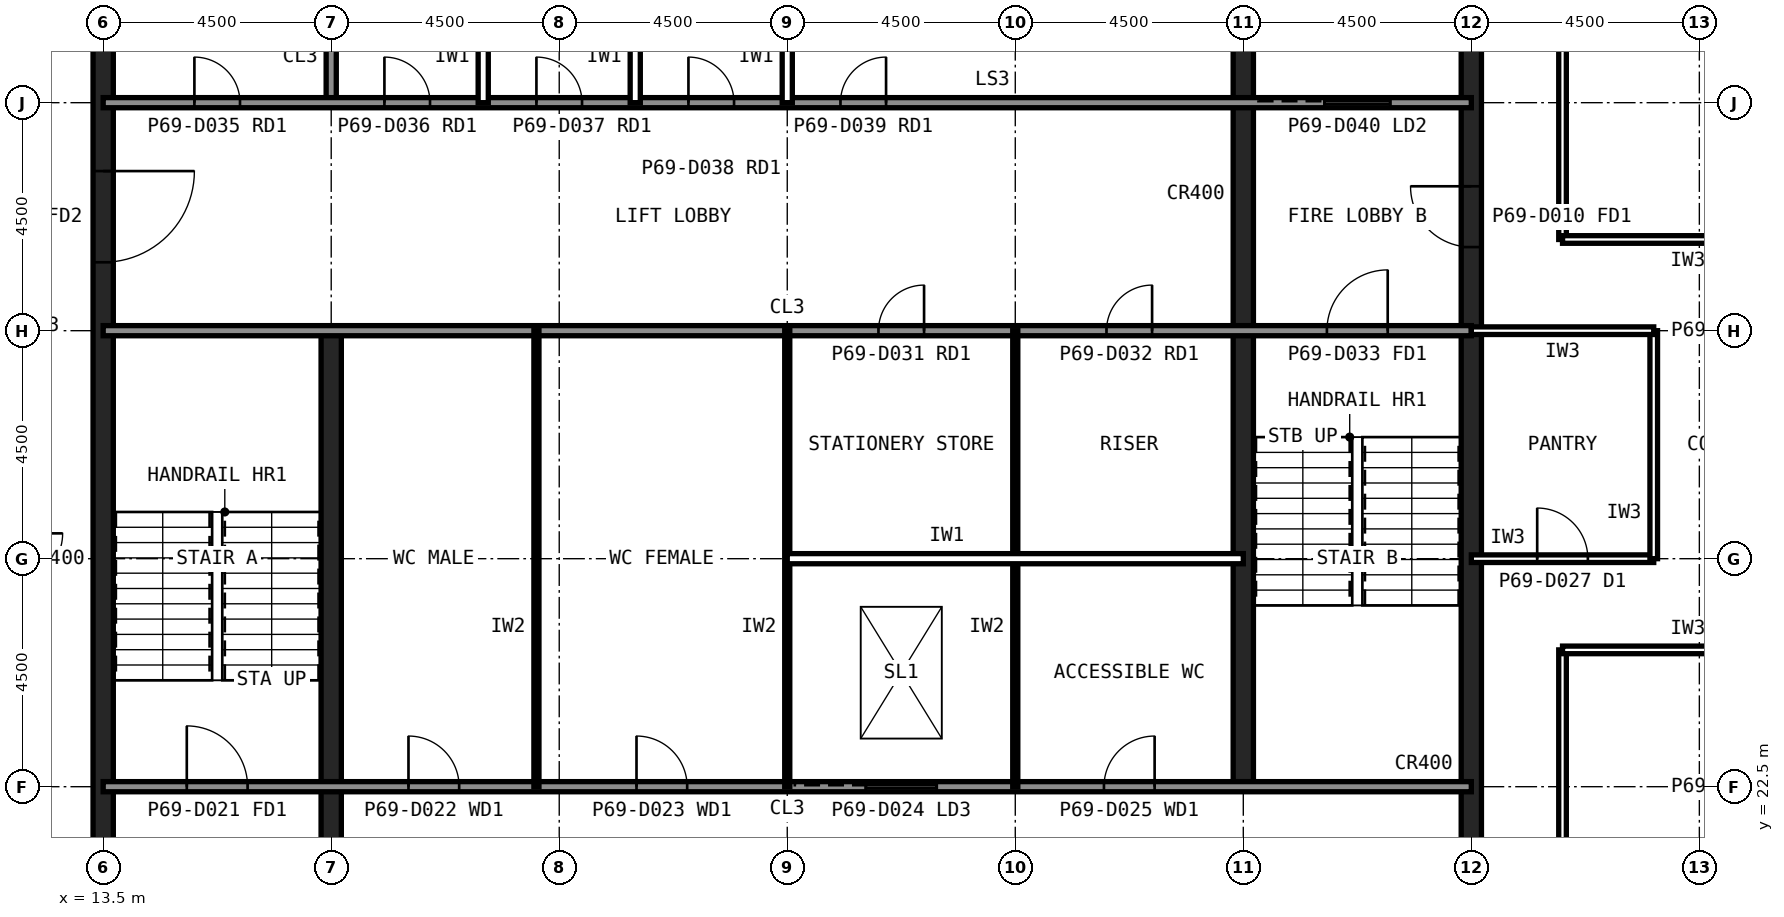
"""IFC4 building model, lengths in metres.
Left out: names, types, materials, properties, quantities, classifications, styles, units other than length and angle.
Written with IfcOpenShell. Run it as: python <this file> out.ifc"""

import sys

from ifc_helpers import new_model, si_unit, direction, frame, frame_2d, origin, place, context, subcontext, project, spatial, rectangle, extrude, element, fill, save


model = new_model("IFC4")
c1 = context("Model", 3, precision=1e-05, world=origin(), true_north=direction((0.0, 1.0)))
c2 = subcontext(c1, "Body", "Model", "MODEL_VIEW")
j1 = project(units=[si_unit("LENGTHUNIT", "METRE"), si_unit("PLANEANGLEUNIT", "RADIAN")], contexts=[c1])
p1 = place(None, origin())
s1 = spatial("IfcSite", under=j1, at=p1, CompositionType="ELEMENT")
p2 = place(p1, origin())
s2 = spatial("IfcBuilding", under=s1, at=p2, CompositionType="ELEMENT")
p3 = place(p2, frame((0.0, 0.0, 286.6)))
s3 = spatial("IfcBuildingStorey", under=s2, at=p3, CompositionType="ELEMENT", Elevation=286.6)
p4 = place(p3, frame((40.5, 13.5, 0.0), z_axis=(0.0, 0.0, 1.0), x_axis=(0.0, 1.0, 0.0)))
e1 = element("IfcWall", 1, at=p4, inside=s3, PredefinedType="SHEAR", context=c2, shape_type="SweptSolid", body=[
    extrude(rectangle(XDim=27.0, YDim=0.4, at=frame_2d((13.5, 0.0))), origin(), (0.0, 0.0, 1.0), 4.0),
])
p5 = place(p4, frame((5.85, 0.0, 0.0)))
e2 = element("IfcOpeningElement", 2, at=p5, cuts=e1, PredefinedType="OPENING", context=c2, shape_type="SweptSolid", body=[
    extrude(rectangle(XDim=1.8, YDim=2.1, at=frame_2d((0.9, 1.05))), frame((0.0, 0.21, 0.0), z_axis=(0.0, -1.0, 0.0), x_axis=(1.0, 0.0, 0.0)), (0.0, 0.0, 1.0), 0.42),
])
p6 = place(p4, frame((19.65, 0.0, 0.0)))
e3 = element("IfcOpeningElement", 3, at=p6, cuts=e1, PredefinedType="OPENING", context=c2, shape_type="SweptSolid", body=[
    extrude(rectangle(XDim=1.2, YDim=2.1, at=frame_2d((0.6, 1.05))), frame((0.0, 0.21, 0.0), z_axis=(0.0, -1.0, 0.0), x_axis=(1.0, 0.0, 0.0)), (0.0, 0.0, 1.0), 0.42),
])
p7 = place(p3, frame((13.5, 40.5, 0.0), z_axis=(0.0, 0.0, 1.0), x_axis=(0.0, -1.0, 0.0)))
e4 = element("IfcWall", 4, at=p7, inside=s3, PredefinedType="SHEAR", context=c2, shape_type="SweptSolid", body=[
    extrude(rectangle(XDim=27.0, YDim=0.4, at=frame_2d((13.5, 0.0))), origin(), (0.0, 0.0, 1.0), 4.0),
])
p8 = place(p7, frame((19.65, 0.0, 0.0)))
e5 = element("IfcOpeningElement", 5, at=p8, cuts=e4, PredefinedType="OPENING", context=c2, shape_type="SweptSolid", body=[
    extrude(rectangle(XDim=1.2, YDim=2.1, at=frame_2d((0.6, 1.05))), frame((0.0, 0.21, 0.0), z_axis=(0.0, -1.0, 0.0), x_axis=(1.0, 0.0, 0.0)), (0.0, 0.0, 1.0), 0.42),
])
p9 = place(p7, frame((5.85, 0.0, 0.0)))
e6 = element("IfcOpeningElement", 6, at=p9, cuts=e4, PredefinedType="OPENING", context=c2, shape_type="SweptSolid", body=[
    extrude(rectangle(XDim=1.8, YDim=2.1, at=frame_2d((0.9, 1.05))), frame((0.0, 0.21, 0.0), z_axis=(0.0, -1.0, 0.0), x_axis=(1.0, 0.0, 0.0)), (0.0, 0.0, 1.0), 0.42),
])
p10 = place(p3, frame((18.0, 13.5, 0.0), z_axis=(0.0, 0.0, 1.0), x_axis=(0.0, 1.0, 0.0)))
e7 = element("IfcWall", 7, at=p10, inside=s3, PredefinedType="SHEAR", context=c2, shape_type="SweptSolid", body=[
    extrude(rectangle(XDim=18.0, YDim=0.4, at=frame_2d((9.0, 0.0))), origin(), (0.0, 0.0, 1.0), 4.0),
])
p11 = place(p3, frame((18.0, 36.0, 0.0), z_axis=(0.0, 0.0, 1.0), x_axis=(0.0, 1.0, 0.0)))
e8 = element("IfcWall", 8, at=p11, inside=s3, PredefinedType="SOLIDWALL", context=c2, shape_type="SweptSolid", body=[
    extrude(rectangle(XDim=4.5, YDim=0.2, at=frame_2d((2.25, 0.0))), origin(), (0.0, 0.0, 1.0), 3.84),
])
p12 = place(p3, frame((36.0, 22.5, 0.0), z_axis=(0.0, 0.0, 1.0), x_axis=(0.0, 1.0, 0.0)))
e9 = element("IfcWall", 9, at=p12, inside=s3, PredefinedType="SHEAR", context=c2, shape_type="SweptSolid", body=[
    extrude(rectangle(XDim=18.0, YDim=0.4, at=frame_2d((9.0, 0.0))), origin(), (0.0, 0.0, 1.0), 4.0),
])
p13 = place(p3, frame((13.5, 36.0, 0.0), z_axis=(0.0, 0.0, 1.0), x_axis=(1.0, 0.0, 0.0)))
e10 = element("IfcWall", 10, at=p13, inside=s3, PredefinedType="SOLIDWALL", context=c2, shape_type="SweptSolid", body=[
    extrude(rectangle(XDim=27.0, YDim=0.2, at=frame_2d((13.5, 0.0))), origin(), (0.0, 0.0, 1.0), 3.84),
])
p14 = place(p13, frame((1.8, 0.0, 0.0)))
e11 = element("IfcOpeningElement", 11, at=p14, cuts=e10, PredefinedType="OPENING", context=c2, shape_type="SweptSolid", body=[
    extrude(rectangle(XDim=0.9, YDim=2.1, at=frame_2d((0.45, 1.05))), frame((0.0, 0.11, 0.0), z_axis=(0.0, -1.0, 0.0), x_axis=(1.0, 0.0, 0.0)), (0.0, 0.0, 1.0), 0.22),
])
p15 = place(p13, frame((5.55, 0.0, 0.0)))
e12 = element("IfcOpeningElement", 12, at=p15, cuts=e10, PredefinedType="OPENING", context=c2, shape_type="SweptSolid", body=[
    extrude(rectangle(XDim=0.9, YDim=2.1, at=frame_2d((0.45, 1.05))), frame((0.0, 0.11, 0.0), z_axis=(0.0, -1.0, 0.0), x_axis=(1.0, 0.0, 0.0)), (0.0, 0.0, 1.0), 0.22),
])
p16 = place(p13, frame((14.55, 0.0, 0.0)))
e13 = element("IfcOpeningElement", 13, at=p16, cuts=e10, PredefinedType="OPENING", context=c2, shape_type="SweptSolid", body=[
    extrude(rectangle(XDim=0.9, YDim=2.1, at=frame_2d((0.45, 1.05))), frame((0.0, 0.11, 0.0), z_axis=(0.0, -1.0, 0.0), x_axis=(1.0, 0.0, 0.0)), (0.0, 0.0, 1.0), 0.22),
])
p17 = place(p13, frame((17.55, 0.0, 0.0)))
e14 = element("IfcOpeningElement", 14, at=p17, cuts=e10, PredefinedType="OPENING", context=c2, shape_type="SweptSolid", body=[
    extrude(rectangle(XDim=0.9, YDim=2.1, at=frame_2d((0.45, 1.05))), frame((0.0, 0.11, 0.0), z_axis=(0.0, -1.0, 0.0), x_axis=(1.0, 0.0, 0.0)), (0.0, 0.0, 1.0), 0.22),
])
p18 = place(p13, frame((24.1, 0.0, 0.0)))
e15 = element("IfcOpeningElement", 15, at=p18, cuts=e10, PredefinedType="OPENING", context=c2, shape_type="SweptSolid", body=[
    extrude(rectangle(XDim=1.3, YDim=2.2, at=frame_2d((0.65, 1.1))), frame((0.0, 0.11, 0.0), z_axis=(0.0, -1.0, 0.0), x_axis=(1.0, 0.0, 0.0)), (0.0, 0.0, 1.0), 0.22),
])
p19 = place(p3, frame((13.5, 22.5, 0.0), z_axis=(0.0, 0.0, 1.0), x_axis=(1.0, 0.0, 0.0)))
e16 = element("IfcWall", 16, at=p19, inside=s3, PredefinedType="SOLIDWALL", context=c2, shape_type="SweptSolid", body=[
    extrude(rectangle(XDim=27.0, YDim=0.2, at=frame_2d((13.5, 0.0))), origin(), (0.0, 0.0, 1.0), 3.84),
])
p20 = place(p19, frame((1.65, 0.0, 0.0)))
e17 = element("IfcOpeningElement", 17, at=p20, cuts=e16, PredefinedType="OPENING", context=c2, shape_type="SweptSolid", body=[
    extrude(rectangle(XDim=1.2, YDim=2.1, at=frame_2d((0.6, 1.05))), frame((0.0, 0.11, 0.0), z_axis=(0.0, -1.0, 0.0), x_axis=(1.0, 0.0, 0.0)), (0.0, 0.0, 1.0), 0.22),
])
p21 = place(p19, frame((6.025, 0.0, 0.0)))
e18 = element("IfcOpeningElement", 18, at=p21, cuts=e16, PredefinedType="OPENING", context=c2, shape_type="SweptSolid", body=[
    extrude(rectangle(XDim=1.0, YDim=2.1, at=frame_2d((0.5, 1.05))), frame((0.0, 0.11, 0.0), z_axis=(0.0, -1.0, 0.0), x_axis=(1.0, 0.0, 0.0)), (0.0, 0.0, 1.0), 0.22),
])
p22 = place(p19, frame((10.525, 0.0, 0.0)))
e19 = element("IfcOpeningElement", 19, at=p22, cuts=e16, PredefinedType="OPENING", context=c2, shape_type="SweptSolid", body=[
    extrude(rectangle(XDim=1.0, YDim=2.1, at=frame_2d((0.5, 1.05))), frame((0.0, 0.11, 0.0), z_axis=(0.0, -1.0, 0.0), x_axis=(1.0, 0.0, 0.0)), (0.0, 0.0, 1.0), 0.22),
])
p23 = place(p19, frame((19.75, 0.0, 0.0)))
e20 = element("IfcOpeningElement", 20, at=p23, cuts=e16, PredefinedType="OPENING", context=c2, shape_type="SweptSolid", body=[
    extrude(rectangle(XDim=1.0, YDim=2.1, at=frame_2d((0.5, 1.05))), frame((0.0, 0.11, 0.0), z_axis=(0.0, -1.0, 0.0), x_axis=(1.0, 0.0, 0.0)), (0.0, 0.0, 1.0), 0.22),
])
p24 = place(p19, frame((15.05, 0.0, 0.0)))
e21 = element("IfcOpeningElement", 21, at=p24, cuts=e16, PredefinedType="OPENING", context=c2, shape_type="SweptSolid", body=[
    extrude(rectangle(XDim=1.4, YDim=2.4, at=frame_2d((0.7, 1.2))), frame((0.0, 0.11, 0.0), z_axis=(0.0, -1.0, 0.0), x_axis=(1.0, 0.0, 0.0)), (0.0, 0.0, 1.0), 0.22),
])
p25 = place(p3, frame((13.5, 31.5, 0.0), z_axis=(0.0, 0.0, 1.0), x_axis=(1.0, 0.0, 0.0)))
e22 = element("IfcWall", 22, at=p25, inside=s3, PredefinedType="SOLIDWALL", context=c2, shape_type="SweptSolid", body=[
    extrude(rectangle(XDim=27.0, YDim=0.2, at=frame_2d((13.5, 0.0))), origin(), (0.0, 0.0, 1.0), 3.84),
])
p26 = place(p25, frame((24.15, 0.0, 0.0)))
e23 = element("IfcOpeningElement", 23, at=p26, cuts=e22, PredefinedType="OPENING", context=c2, shape_type="SweptSolid", body=[
    extrude(rectangle(XDim=1.2, YDim=2.1, at=frame_2d((0.6, 1.05))), frame((0.0, 0.11, 0.0), z_axis=(0.0, -1.0, 0.0), x_axis=(1.0, 0.0, 0.0)), (0.0, 0.0, 1.0), 0.22),
])
p27 = place(p25, frame((15.3, 0.0, 0.0)))
e24 = element("IfcOpeningElement", 24, at=p27, cuts=e22, PredefinedType="OPENING", context=c2, shape_type="SweptSolid", body=[
    extrude(rectangle(XDim=0.9, YDim=2.1, at=frame_2d((0.45, 1.05))), frame((0.0, 0.11, 0.0), z_axis=(0.0, -1.0, 0.0), x_axis=(1.0, 0.0, 0.0)), (0.0, 0.0, 1.0), 0.22),
])
p28 = place(p25, frame((19.8, 0.0, 0.0)))
e25 = element("IfcOpeningElement", 25, at=p28, cuts=e22, PredefinedType="OPENING", context=c2, shape_type="SweptSolid", body=[
    extrude(rectangle(XDim=0.9, YDim=2.1, at=frame_2d((0.45, 1.05))), frame((0.0, 0.11, 0.0), z_axis=(0.0, -1.0, 0.0), x_axis=(1.0, 0.0, 0.0)), (0.0, 0.0, 1.0), 0.22),
])
for number, where, z_axis, x_axis in (
    (26, (27.0, 36.0, 0.0), (0.0, 0.0, 1.0), (0.0, 1.0, 0.0)),
    (27, (30.0, 36.0, 0.0), (0.0, 0.0, 1.0), (0.0, 1.0, 0.0)),
):
    element("IfcWall", number, at=place(p3, frame(where, z_axis=z_axis, x_axis=x_axis)), inside=s3, PredefinedType="PARTITIONING", context=c2, shape_type="SweptSolid", body=[
        extrude(rectangle(XDim=4.5, YDim=0.2, at=frame_2d((2.25, 0.0))), origin(), (0.0, 0.0, 1.0), 3.84),
    ])
for number, where, z_axis, x_axis in (
    (28, (22.05, 22.5, 0.0), (0.0, 0.0, 1.0), (0.0, 1.0, 0.0)),
    (29, (27.0, 22.5, 0.0), (0.0, 0.0, 1.0), (0.0, 1.0, 0.0)),
    (30, (31.5, 22.5, 0.0), (0.0, 0.0, 1.0), (0.0, 1.0, 0.0)),
):
    element("IfcWall", number, at=place(p3, frame(where, z_axis=z_axis, x_axis=x_axis)), inside=s3, PredefinedType="PLUMBINGWALL", context=c2, shape_type="SweptSolid", body=[
        extrude(rectangle(XDim=9.0, YDim=0.1, at=frame_2d((4.5, 0.0))), origin(), (0.0, 0.0, 1.0), 3.84),
    ])
p29 = place(p3, frame((27.0, 27.0, 0.0), z_axis=(0.0, 0.0, 1.0), x_axis=(1.0, 0.0, 0.0)))
e31 = element("IfcWall", 31, at=p29, inside=s3, PredefinedType="PARTITIONING", context=c2, shape_type="SweptSolid", body=[
    extrude(rectangle(XDim=9.0, YDim=0.2, at=frame_2d((4.5, 0.0))), origin(), (0.0, 0.0, 1.0), 3.84),
])
p30 = place(p3, frame((42.3, 11.7, 0.0), z_axis=(0.0, 0.0, 1.0), x_axis=(0.0, 1.0, 0.0)))
e32 = element("IfcWall", 32, at=p30, inside=s3, PredefinedType="PARTITIONING", context=c2, shape_type="SweptSolid", body=[
    extrude(rectangle(XDim=13.5, YDim=0.15, at=frame_2d((6.75, 0.0))), origin(), (0.0, 0.0, 1.0), 3.84),
])
p31 = place(p30, frame((6.25, 0.0, 0.0)))
e33 = element("IfcOpeningElement", 33, at=p31, cuts=e32, PredefinedType="OPENING", context=c2, shape_type="SweptSolid", body=[
    extrude(rectangle(XDim=1.0, YDim=2.1, at=frame_2d((0.5, 1.05))), frame((0.0, 0.085, 0.0), z_axis=(0.0, -1.0, 0.0), x_axis=(1.0, 0.0, 0.0)), (0.0, 0.0, 1.0), 0.17),
])
p32 = place(p3, frame((42.3, 25.2, 0.0), z_axis=(0.0, 0.0, 1.0), x_axis=(1.0, 0.0, 0.0)))
e34 = element("IfcWall", 34, at=p32, inside=s3, PredefinedType="PARTITIONING", context=c2, shape_type="SweptSolid", body=[
    extrude(rectangle(XDim=4.95, YDim=0.15, at=frame_2d((2.475, 0.0))), origin(), (0.0, 0.0, 1.0), 3.84),
])
p33 = place(p3, frame((42.3, 33.3, 0.0), z_axis=(0.0, 0.0, 1.0), x_axis=(0.0, 1.0, 0.0)))
e35 = element("IfcWall", 35, at=p33, inside=s3, PredefinedType="PARTITIONING", context=c2, shape_type="SweptSolid", body=[
    extrude(rectangle(XDim=13.5, YDim=0.15, at=frame_2d((6.75, 0.0))), origin(), (0.0, 0.0, 1.0), 3.84),
])
p34 = place(p33, frame((6.25, 0.0, 0.0)))
e36 = element("IfcOpeningElement", 36, at=p34, cuts=e35, PredefinedType="OPENING", context=c2, shape_type="SweptSolid", body=[
    extrude(rectangle(XDim=1.0, YDim=2.1, at=frame_2d((0.5, 1.05))), frame((0.0, 0.085, 0.0), z_axis=(0.0, -1.0, 0.0), x_axis=(1.0, 0.0, 0.0)), (0.0, 0.0, 1.0), 0.17),
])
p35 = place(p3, frame((47.25, 33.3, 0.0), z_axis=(0.0, 0.0, 1.0), x_axis=(-1.0, 0.0, 0.0)))
e37 = element("IfcWall", 37, at=p35, inside=s3, PredefinedType="PARTITIONING", context=c2, shape_type="SweptSolid", body=[
    extrude(rectangle(XDim=4.95, YDim=0.15, at=frame_2d((2.475, 0.0))), origin(), (0.0, 0.0, 1.0), 3.84),
])
p36 = place(p3, frame((40.5, 27.0, 0.0), z_axis=(0.0, 0.0, 1.0), x_axis=(1.0, 0.0, 0.0)))
e38 = element("IfcWall", 38, at=p36, inside=s3, PredefinedType="PARTITIONING", context=c2, shape_type="SweptSolid", body=[
    extrude(rectangle(XDim=3.6, YDim=0.15, at=frame_2d((1.8, 0.0))), origin(), (0.0, 0.0, 1.0), 2.989),
])
p37 = place(p36, frame((1.3, 0.0, 0.0)))
e39 = element("IfcOpeningElement", 39, at=p37, cuts=e38, PredefinedType="OPENING", context=c2, shape_type="SweptSolid", body=[
    extrude(rectangle(XDim=1.0, YDim=2.1, at=frame_2d((0.5, 1.05))), frame((0.0, 0.085, 0.0), z_axis=(0.0, -1.0, 0.0), x_axis=(1.0, 0.0, 0.0)), (0.0, 0.0, 1.0), 0.17),
])
p38 = place(p3, frame((44.1, 27.0, 0.0), z_axis=(0.0, 0.0, 1.0), x_axis=(0.0, 1.0, 0.0)))
e40 = element("IfcWall", 40, at=p38, inside=s3, PredefinedType="PARTITIONING", context=c2, shape_type="SweptSolid", body=[
    extrude(rectangle(XDim=4.5, YDim=0.15, at=frame_2d((2.25, 0.0))), origin(), (0.0, 0.0, 1.0), 3.84),
])
p39 = place(p3, frame((44.1, 31.5, 0.0), z_axis=(0.0, 0.0, 1.0), x_axis=(-1.0, 0.0, 0.0)))
e41 = element("IfcWall", 41, at=p39, inside=s3, PredefinedType="PARTITIONING", context=c2, shape_type="SweptSolid", body=[
    extrude(rectangle(XDim=3.6, YDim=0.15, at=frame_2d((1.8, 0.0))), origin(), (0.0, 0.0, 1.0), 2.989),
])
p40 = place(p9, origin())
e42 = element("IfcDoor", 42, at=p40, inside=s3, OperationType="SINGLE_SWING_LEFT", PredefinedType="DOOR", context=c2, shape_type="SweptSolid", body=[
    extrude(rectangle(XDim=1.8, YDim=2.1, at=frame_2d((0.9, 1.05))), frame((0.0, 0.025, 0.0), z_axis=(0.0, -1.0, 0.0), x_axis=(1.0, 0.0, 0.0)), (0.0, 0.0, 1.0), 0.05),
])
fill(e6, e42)
p41 = place(p6, origin())
e43 = element("IfcDoor", 43, at=p41, inside=s3, OperationType="SINGLE_SWING_RIGHT", PredefinedType="DOOR", context=c2, shape_type="SweptSolid", body=[
    extrude(rectangle(XDim=1.2, YDim=2.1, at=frame_2d((0.6, 1.05))), frame((0.0, 0.025, 0.0), z_axis=(0.0, -1.0, 0.0), x_axis=(1.0, 0.0, 0.0)), (0.0, 0.0, 1.0), 0.05),
])
fill(e3, e43)
p42 = place(p20, origin())
e44 = element("IfcDoor", 44, at=p42, inside=s3, OperationType="SINGLE_SWING_LEFT", PredefinedType="DOOR", context=c2, shape_type="SweptSolid", body=[
    extrude(rectangle(XDim=1.2, YDim=2.1, at=frame_2d((0.6, 1.05))), frame((0.0, 0.025, 0.0), z_axis=(0.0, -1.0, 0.0), x_axis=(1.0, 0.0, 0.0)), (0.0, 0.0, 1.0), 0.05),
])
fill(e17, e44)
p43 = place(p26, origin())
e45 = element("IfcDoor", 45, at=p43, inside=s3, OperationType="SINGLE_SWING_RIGHT", PredefinedType="DOOR", context=c2, shape_type="SweptSolid", body=[
    extrude(rectangle(XDim=1.2, YDim=2.1, at=frame_2d((0.6, 1.05))), frame((0.0, 0.025, 0.0), z_axis=(0.0, -1.0, 0.0), x_axis=(1.0, 0.0, 0.0)), (0.0, 0.0, 1.0), 0.05),
])
fill(e23, e45)
p44 = place(p21, origin())
e46 = element("IfcDoor", 46, at=p44, inside=s3, OperationType="SINGLE_SWING_LEFT", PredefinedType="DOOR", context=c2, shape_type="SweptSolid", body=[
    extrude(rectangle(XDim=1.0, YDim=2.1, at=frame_2d((0.5, 1.05))), frame((0.0, 0.025, 0.0), z_axis=(0.0, -1.0, 0.0), x_axis=(1.0, 0.0, 0.0)), (0.0, 0.0, 1.0), 0.05),
])
fill(e18, e46)
p45 = place(p22, origin())
e47 = element("IfcDoor", 47, at=p45, inside=s3, OperationType="SINGLE_SWING_LEFT", PredefinedType="DOOR", context=c2, shape_type="SweptSolid", body=[
    extrude(rectangle(XDim=1.0, YDim=2.1, at=frame_2d((0.5, 1.05))), frame((0.0, 0.025, 0.0), z_axis=(0.0, -1.0, 0.0), x_axis=(1.0, 0.0, 0.0)), (0.0, 0.0, 1.0), 0.05),
])
fill(e19, e47)
p46 = place(p23, origin())
e48 = element("IfcDoor", 48, at=p46, inside=s3, OperationType="SINGLE_SWING_RIGHT", PredefinedType="DOOR", context=c2, shape_type="SweptSolid", body=[
    extrude(rectangle(XDim=1.0, YDim=2.1, at=frame_2d((0.5, 1.05))), frame((0.0, 0.025, 0.0), z_axis=(0.0, -1.0, 0.0), x_axis=(1.0, 0.0, 0.0)), (0.0, 0.0, 1.0), 0.05),
])
fill(e20, e48)
p47 = place(p27, origin())
e49 = element("IfcDoor", 49, at=p47, inside=s3, OperationType="SINGLE_SWING_RIGHT", PredefinedType="DOOR", context=c2, shape_type="SweptSolid", body=[
    extrude(rectangle(XDim=0.9, YDim=2.1, at=frame_2d((0.45, 1.05))), frame((0.0, 0.025, 0.0), z_axis=(0.0, -1.0, 0.0), x_axis=(1.0, 0.0, 0.0)), (0.0, 0.0, 1.0), 0.05),
])
fill(e24, e49)
p48 = place(p28, origin())
e50 = element("IfcDoor", 50, at=p48, inside=s3, OperationType="SINGLE_SWING_RIGHT", PredefinedType="DOOR", context=c2, shape_type="SweptSolid", body=[
    extrude(rectangle(XDim=0.9, YDim=2.1, at=frame_2d((0.45, 1.05))), frame((0.0, 0.025, 0.0), z_axis=(0.0, -1.0, 0.0), x_axis=(1.0, 0.0, 0.0)), (0.0, 0.0, 1.0), 0.05),
])
fill(e25, e50)
p49 = place(p14, origin())
e51 = element("IfcDoor", 51, at=p49, inside=s3, OperationType="SINGLE_SWING_LEFT", PredefinedType="DOOR", context=c2, shape_type="SweptSolid", body=[
    extrude(rectangle(XDim=0.9, YDim=2.1, at=frame_2d((0.45, 1.05))), frame((0.0, 0.025, 0.0), z_axis=(0.0, -1.0, 0.0), x_axis=(1.0, 0.0, 0.0)), (0.0, 0.0, 1.0), 0.05),
])
fill(e11, e51)
p50 = place(p15, origin())
e52 = element("IfcDoor", 52, at=p50, inside=s3, OperationType="SINGLE_SWING_LEFT", PredefinedType="DOOR", context=c2, shape_type="SweptSolid", body=[
    extrude(rectangle(XDim=0.9, YDim=2.1, at=frame_2d((0.45, 1.05))), frame((0.0, 0.025, 0.0), z_axis=(0.0, -1.0, 0.0), x_axis=(1.0, 0.0, 0.0)), (0.0, 0.0, 1.0), 0.05),
])
fill(e12, e52)
p51 = place(p16, origin())
e53 = element("IfcDoor", 53, at=p51, inside=s3, OperationType="SINGLE_SWING_RIGHT", PredefinedType="DOOR", context=c2, shape_type="SweptSolid", body=[
    extrude(rectangle(XDim=0.9, YDim=2.1, at=frame_2d((0.45, 1.05))), frame((0.0, 0.025, 0.0), z_axis=(0.0, -1.0, 0.0), x_axis=(1.0, 0.0, 0.0)), (0.0, 0.0, 1.0), 0.05),
])
fill(e13, e53)
p52 = place(p17, origin())
e54 = element("IfcDoor", 54, at=p52, inside=s3, OperationType="SINGLE_SWING_RIGHT", PredefinedType="DOOR", context=c2, shape_type="SweptSolid", body=[
    extrude(rectangle(XDim=0.9, YDim=2.1, at=frame_2d((0.45, 1.05))), frame((0.0, 0.025, 0.0), z_axis=(0.0, -1.0, 0.0), x_axis=(1.0, 0.0, 0.0)), (0.0, 0.0, 1.0), 0.05),
])
fill(e14, e54)
p53 = place(p18, origin())
e55 = element("IfcDoor", 55, at=p53, inside=s3, OperationType="SLIDING_TO_LEFT", PredefinedType="DOOR", context=c2, shape_type="SweptSolid", body=[
    extrude(rectangle(XDim=1.3, YDim=2.2, at=frame_2d((0.65, 1.1))), frame((0.0, 0.025, 0.0), z_axis=(0.0, -1.0, 0.0), x_axis=(1.0, 0.0, 0.0)), (0.0, 0.0, 1.0), 0.05),
])
fill(e15, e55)
p54 = place(p24, origin())
e56 = element("IfcDoor", 56, at=p54, inside=s3, OperationType="SLIDING_TO_LEFT", PredefinedType="DOOR", context=c2, shape_type="SweptSolid", body=[
    extrude(rectangle(XDim=1.4, YDim=2.4, at=frame_2d((0.7, 1.2))), frame((0.0, 0.025, 0.0), z_axis=(0.0, -1.0, 0.0), x_axis=(1.0, 0.0, 0.0)), (0.0, 0.0, 1.0), 0.05),
])
fill(e21, e56)
p55 = place(p37, origin())
e57 = element("IfcDoor", 57, at=p55, inside=s3, OperationType="SINGLE_SWING_LEFT", PredefinedType="DOOR", context=c2, shape_type="SweptSolid", body=[
    extrude(rectangle(XDim=1.0, YDim=2.1, at=frame_2d((0.5, 1.05))), frame((0.0, 0.025, 0.0), z_axis=(0.0, -1.0, 0.0), x_axis=(1.0, 0.0, 0.0)), (0.0, 0.0, 1.0), 0.05),
])
fill(e39, e57)
save(model, sys.argv[1])
